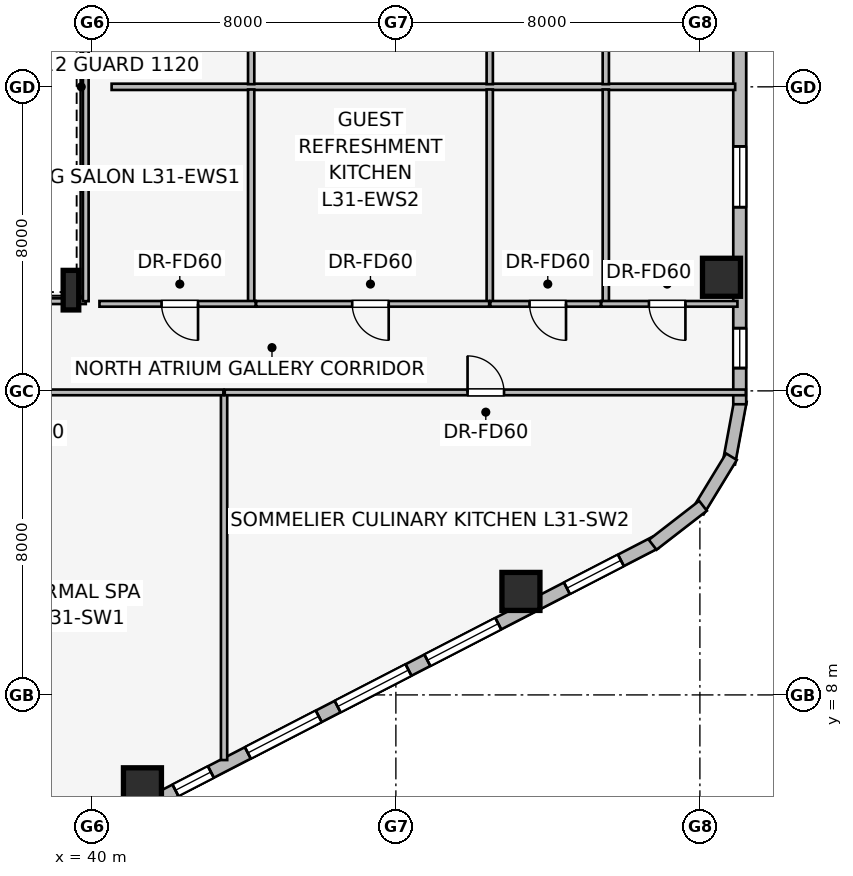
"""IFC4 building model, lengths in metres.
Left out: names, types, materials, properties, quantities, classifications, styles, units other than length and angle.
Written with IfcOpenShell. Run it as: python <this file> out.ifc"""

import sys

from ifc_helpers import new_model, si_unit, direction, frame, frame_2d, origin, origin_2d, place, context, subcontext, project, spatial, rectangle, i_section, extrude, element, fill, save


model = new_model("IFC4")
c1 = context("Model", 3, precision=1e-05, world=origin(), true_north=direction((0.0, 1.0)))
c2 = subcontext(c1, "Body", "Model", "MODEL_VIEW")
j1 = project(units=[si_unit("LENGTHUNIT", "METRE"), si_unit("PLANEANGLEUNIT", "RADIAN")], contexts=[c1])
p1 = place(None, origin())
s1 = spatial("IfcSite", under=j1, at=p1, CompositionType="ELEMENT")
p2 = place(p1, origin())
s2 = spatial("IfcBuilding", under=s1, at=p2, CompositionType="ELEMENT")
p3 = place(p2, frame((0.0, 0.0, 118.8)))
s3 = spatial("IfcBuildingStorey", under=s2, at=p3, CompositionType="ELEMENT", Elevation=118.8)
for number, where, z_axis, x_axis in (
    (1, (41.331, 5.582, 0.0), (0.0, 0.0, 1.0), (1.0, 0.0, 0.0)),
    (2, (51.291, 10.723, 0.0), (0.0, 0.0, 1.0), (1.0, 0.0, 0.0)),
    (3, (56.568, 18.989, 0.0), (0.0, 0.0, 1.0), (1.0, 0.0, 0.0)),
):
    element("IfcColumn", number, at=place(p3, frame(where, z_axis=z_axis, x_axis=x_axis)), inside=s3, PredefinedType="COLUMN", context=c2, shape_type="SweptSolid", body=[
        extrude(rectangle(XDim=1.0, YDim=1.0, at=origin_2d()), origin(), (0.0, 0.0, 1.0), 3.45),
    ])
p4 = place(p3, frame((39.45, 18.65, 0.0), z_axis=(0.0, 0.0, 1.0), x_axis=(1.0, 0.0, 0.0)))
e4 = element("IfcColumn", 4, at=p4, inside=s3, PredefinedType="COLUMN", context=c2, shape_type="SweptSolid", body=[
    extrude(i_section(OverallWidth=0.41, OverallDepth=1.041, WebThickness=0.031, FlangeThickness=0.056, at=origin_2d()), origin(), (0.0, 0.0, 1.0), 3.45),
])
p5 = place(p3, frame((54.831, 12.01, 0.0), z_axis=(0.0, 0.0, 1.0), x_axis=(-0.888613612362, -0.458656568606, 0.0)))
e5 = element("IfcWall", 5, at=p5, inside=s3, PredefinedType="STANDARD", context=c2, shape_type="SweptSolid", body=[
    extrude(rectangle(XDim=18.681, YDim=0.34, at=frame_2d((9.34, 0.0))), origin(), (0.0, 0.0, 1.0), 3.19),
])
p6 = place(p5, frame((1.023, 0.0, 0.75)))
e6 = element("IfcOpeningElement", 6, at=p6, cuts=e5, PredefinedType="OPENING", context=c2, shape_type="SweptSolid", body=[
    extrude(rectangle(XDim=1.6, YDim=1.55, at=frame_2d((0.8, 0.775))), frame((0.0, 0.18, 0.0), z_axis=(0.0, -1.0, 0.0), x_axis=(1.0, 0.0, 0.0)), (0.0, 0.0, 1.0), 0.36),
])
p7 = place(p5, frame((4.655, 0.0, 0.75)))
e7 = element("IfcOpeningElement", 7, at=p7, cuts=e5, PredefinedType="OPENING", context=c2, shape_type="SweptSolid", body=[
    extrude(rectangle(XDim=2.1, YDim=1.5, at=frame_2d((1.05, 0.75))), frame((0.0, 0.18, 0.0), z_axis=(0.0, -1.0, 0.0), x_axis=(1.0, 0.0, 0.0)), (0.0, 0.0, 1.0), 0.36),
])
p8 = place(p5, frame((7.313, 0.0, 0.75)))
e8 = element("IfcOpeningElement", 8, at=p8, cuts=e5, PredefinedType="OPENING", context=c2, shape_type="SweptSolid", body=[
    extrude(rectangle(XDim=2.1, YDim=1.5, at=frame_2d((1.05, 0.75))), frame((0.0, 0.18, 0.0), z_axis=(0.0, -1.0, 0.0), x_axis=(1.0, 0.0, 0.0)), (0.0, 0.0, 1.0), 0.36),
])
p9 = place(p5, frame((9.971, 0.0, 0.75)))
e9 = element("IfcOpeningElement", 9, at=p9, cuts=e5, PredefinedType="OPENING", context=c2, shape_type="SweptSolid", body=[
    extrude(rectangle(XDim=2.1, YDim=1.5, at=frame_2d((1.05, 0.75))), frame((0.0, 0.18, 0.0), z_axis=(0.0, -1.0, 0.0), x_axis=(1.0, 0.0, 0.0)), (0.0, 0.0, 1.0), 0.36),
])
p10 = place(p5, frame((13.165, 0.0, 0.75)))
e10 = element("IfcOpeningElement", 10, at=p10, cuts=e5, PredefinedType="OPENING", context=c2, shape_type="SweptSolid", body=[
    extrude(rectangle(XDim=1.05, YDim=1.4, at=frame_2d((0.525, 0.7))), frame((0.0, 0.18, 0.0), z_axis=(0.0, -1.0, 0.0), x_axis=(1.0, 0.0, 0.0)), (0.0, 0.0, 1.0), 0.36),
])
p11 = place(p5, frame((15.808, 0.0, 0.75)))
e11 = element("IfcOpeningElement", 11, at=p11, cuts=e5, PredefinedType="OPENING", context=c2, shape_type="SweptSolid", body=[
    extrude(rectangle(XDim=2.1, YDim=1.5, at=frame_2d((1.05, 0.75))), frame((0.0, 0.18, 0.0), z_axis=(0.0, -1.0, 0.0), x_axis=(1.0, 0.0, 0.0)), (0.0, 0.0, 1.0), 0.36),
])
p12 = place(p3, frame((57.068, 15.742, 0.0), z_axis=(0.0, 0.0, 1.0), x_axis=(-0.181984991895, -0.983301308209, 0.0)))
e12 = element("IfcWall", 12, at=p12, inside=s3, PredefinedType="STANDARD", context=c2, shape_type="SweptSolid", body=[
    extrude(rectangle(XDim=1.677, YDim=0.33, at=frame_2d((0.838, 0.0))), origin(), (0.0, 0.0, 1.0), 3.19),
])
p13 = place(p3, frame((56.83, 14.268, 0.0), z_axis=(0.0, 0.0, 1.0), x_axis=(-0.520519429557, -0.853849824883, 0.0)))
e13 = element("IfcWall", 13, at=p13, inside=s3, PredefinedType="STANDARD", context=c2, shape_type="SweptSolid", body=[
    extrude(rectangle(XDim=1.677, YDim=0.33, at=frame_2d((0.839, 0.0))), origin(), (0.0, 0.0, 1.0), 3.19),
])
p14 = place(p3, frame((56.082, 12.976, 0.0), z_axis=(0.0, 0.0, 1.0), x_axis=(-0.790621329885, -0.612305408053, 0.0)))
e14 = element("IfcWall", 14, at=p14, inside=s3, PredefinedType="STANDARD", context=c2, shape_type="SweptSolid", body=[
    extrude(rectangle(XDim=1.676, YDim=0.33, at=frame_2d((0.838, 0.0))), origin(), (0.0, 0.0, 1.0), 3.19),
])
p15 = place(p3, frame((57.048, 32.352, 0.0), z_axis=(0.0, 0.0, 1.0), x_axis=(0.0, -1.0, 0.0)))
e15 = element("IfcWall", 15, at=p15, inside=s3, PredefinedType="STANDARD", context=c2, shape_type="SweptSolid", body=[
    extrude(rectangle(XDim=16.704, YDim=0.34, at=frame_2d((8.352, 0.0))), origin(), (0.0, 0.0, 1.0), 3.19),
])
p16 = place(p15, frame((0.992, 0.0, 0.75)))
e16 = element("IfcOpeningElement", 16, at=p16, cuts=e15, PredefinedType="OPENING", context=c2, shape_type="SweptSolid", body=[
    extrude(rectangle(XDim=1.05, YDim=1.4, at=frame_2d((0.525, 0.7))), frame((0.0, 0.18, 0.0), z_axis=(0.0, -1.0, 0.0), x_axis=(1.0, 0.0, 0.0)), (0.0, 0.0, 1.0), 0.36),
])
p17 = place(p15, frame((4.935, 0.0, 0.75)))
e17 = element("IfcOpeningElement", 17, at=p17, cuts=e15, PredefinedType="OPENING", context=c2, shape_type="SweptSolid", body=[
    extrude(rectangle(XDim=2.1, YDim=1.5, at=frame_2d((1.05, 0.75))), frame((0.0, 0.18, 0.0), z_axis=(0.0, -1.0, 0.0), x_axis=(1.0, 0.0, 0.0)), (0.0, 0.0, 1.0), 0.36),
])
p18 = place(p15, frame((9.919, 0.0, 0.75)))
e18 = element("IfcOpeningElement", 18, at=p18, cuts=e15, PredefinedType="OPENING", context=c2, shape_type="SweptSolid", body=[
    extrude(rectangle(XDim=1.6, YDim=1.55, at=frame_2d((0.8, 0.775))), frame((0.0, 0.18, 0.0), z_axis=(0.0, -1.0, 0.0), x_axis=(1.0, 0.0, 0.0)), (0.0, 0.0, 1.0), 0.36),
])
p19 = place(p15, frame((14.702, 0.0, 0.75)))
e19 = element("IfcOpeningElement", 19, at=p19, cuts=e15, PredefinedType="OPENING", context=c2, shape_type="SweptSolid", body=[
    extrude(rectangle(XDim=1.05, YDim=1.4, at=frame_2d((0.525, 0.7))), frame((0.0, 0.18, 0.0), z_axis=(0.0, -1.0, 0.0), x_axis=(1.0, 0.0, 0.0)), (0.0, 0.0, 1.0), 0.36),
])
p20 = place(p3, frame((27.675, 18.36, 0.0), z_axis=(0.0, 0.0, 1.0), x_axis=(1.0, 0.0, 0.0)))
e20 = element("IfcWall", 20, at=p20, inside=s3, PredefinedType="PARTITIONING", context=c2, shape_type="SweptSolid", body=[
    extrude(rectangle(XDim=12.165, YDim=0.15, at=frame_2d((6.083, 0.0))), origin(), (0.0, 0.0, 1.0), 2.331),
])
p21 = place(p3, frame((39.84, 18.36, 0.0), z_axis=(0.0, 0.0, 1.0), x_axis=(0.0, 1.0, 0.0)))
e21 = element("IfcWall", 21, at=p21, inside=s3, PredefinedType="PARTITIONING", context=c2, shape_type="SweptSolid", body=[
    extrude(rectangle(XDim=11.28, YDim=0.15, at=frame_2d((5.64, 0.0))), origin(), (0.0, 0.0, 1.0), 3.19),
])
p22 = place(p3, frame((40.52, 24.0, 0.0), z_axis=(0.0, 0.0, 1.0), x_axis=(1.0, 0.0, 0.0)))
e22 = element("IfcWall", 22, at=p22, inside=s3, PredefinedType="PARTITIONING", context=c2, shape_type="SweptSolid", body=[
    extrude(rectangle(XDim=16.408, YDim=0.165, at=frame_2d((8.204, 0.0))), origin(), (0.0, 0.0, 1.0), 3.19),
])
p23 = place(p3, frame((44.192, 24.07, 0.0), z_axis=(0.0, 0.0, 1.0), x_axis=(0.0, 1.0, 0.0)))
e23 = element("IfcWall", 23, at=p23, inside=s3, PredefinedType="PARTITIONING", context=c2, shape_type="SweptSolid", body=[
    extrude(rectangle(XDim=5.64, YDim=0.165, at=frame_2d((2.82, 0.0))), origin(), (0.0, 0.0, 1.0), 2.733),
])
for number, where, z_axis, x_axis in (
    (24, (50.47, 24.07, 0.0), (0.0, 0.0, 1.0), (0.0, 1.0, 0.0)),
    (25, (53.524, 24.07, 0.0), (0.0, 0.0, 1.0), (0.0, 1.0, 0.0)),
):
    element("IfcWall", number, at=place(p3, frame(where, z_axis=z_axis, x_axis=x_axis)), inside=s3, PredefinedType="PARTITIONING", context=c2, shape_type="SweptSolid", body=[
        extrude(rectangle(XDim=5.64, YDim=0.165, at=frame_2d((2.82, 0.0))), origin(), (0.0, 0.0, 1.0), 3.19),
    ])
p24 = place(p3, frame((44.192, 18.29, 0.0), z_axis=(0.0, 0.0, 1.0), x_axis=(0.0, 1.0, 0.0)))
e26 = element("IfcWall", 26, at=p24, inside=s3, PredefinedType="PARTITIONING", context=c2, shape_type="SweptSolid", body=[
    extrude(rectangle(XDim=5.64, YDim=0.165, at=frame_2d((2.82, 0.0))), origin(), (0.0, 0.0, 1.0), 2.733),
])
for number, where, z_axis, x_axis in (
    (27, (50.47, 18.29, 0.0), (0.0, 0.0, 1.0), (0.0, 1.0, 0.0)),
    (28, (53.524, 18.29, 0.0), (0.0, 0.0, 1.0), (0.0, 1.0, 0.0)),
):
    element("IfcWall", number, at=place(p3, frame(where, z_axis=z_axis, x_axis=x_axis)), inside=s3, PredefinedType="PARTITIONING", context=c2, shape_type="SweptSolid", body=[
        extrude(rectangle(XDim=5.64, YDim=0.165, at=frame_2d((2.82, 0.0))), origin(), (0.0, 0.0, 1.0), 3.19),
    ])
p25 = place(p3, frame((44.312, 18.29, 0.0), z_axis=(0.0, 0.0, 1.0), x_axis=(-1.0, 0.0, 0.0)))
e29 = element("IfcWall", 29, at=p25, inside=s3, PredefinedType="PARTITIONING", context=c2, shape_type="SweptSolid", body=[
    extrude(rectangle(XDim=4.112, YDim=0.15, at=frame_2d((2.056, 0.0))), origin(), (0.0, 0.0, 1.0), 3.19),
])
p26 = place(p25, frame((1.518, 0.0, 0.0)))
e30 = element("IfcOpeningElement", 30, at=p26, cuts=e29, PredefinedType="OPENING", context=c2, shape_type="SweptSolid", body=[
    extrude(rectangle(XDim=0.96, YDim=2.0, at=frame_2d((0.48, 1.0))), frame((0.0, 0.085, 0.0), z_axis=(0.0, -1.0, 0.0), x_axis=(1.0, 0.0, 0.0)), (0.0, 0.0, 1.0), 0.17),
])
p27 = place(p3, frame((50.455, 18.29, 0.0), z_axis=(0.0, 0.0, 1.0), x_axis=(-1.0, 0.0, 0.0)))
e31 = element("IfcWall", 31, at=p27, inside=s3, PredefinedType="PARTITIONING", context=c2, shape_type="SweptSolid", body=[
    extrude(rectangle(XDim=6.133, YDim=0.15, at=frame_2d((3.066, 0.0))), origin(), (0.0, 0.0, 1.0), 3.19),
])
p28 = place(p27, frame((2.644, 0.0, 0.0)))
e32 = element("IfcOpeningElement", 32, at=p28, cuts=e31, PredefinedType="OPENING", context=c2, shape_type="SweptSolid", body=[
    extrude(rectangle(XDim=0.96, YDim=2.0, at=frame_2d((0.48, 1.0))), frame((0.0, 0.085, 0.0), z_axis=(0.0, -1.0, 0.0), x_axis=(1.0, 0.0, 0.0)), (0.0, 0.0, 1.0), 0.17),
])
p29 = place(p3, frame((53.394, 18.29, 0.0), z_axis=(0.0, 0.0, 1.0), x_axis=(-1.0, 0.0, 0.0)))
e33 = element("IfcWall", 33, at=p29, inside=s3, PredefinedType="PARTITIONING", context=c2, shape_type="SweptSolid", body=[
    extrude(rectangle(XDim=2.909, YDim=0.15, at=frame_2d((1.455, 0.0))), origin(), (0.0, 0.0, 1.0), 3.19),
])
p30 = place(p29, frame((0.917, 0.0, 0.0)))
e34 = element("IfcOpeningElement", 34, at=p30, cuts=e33, PredefinedType="OPENING", context=c2, shape_type="SweptSolid", body=[
    extrude(rectangle(XDim=0.96, YDim=2.0, at=frame_2d((0.48, 1.0))), frame((0.0, 0.085, 0.0), z_axis=(0.0, -1.0, 0.0), x_axis=(1.0, 0.0, 0.0)), (0.0, 0.0, 1.0), 0.17),
])
p31 = place(p3, frame((56.988, 18.29, 0.0), z_axis=(0.0, 0.0, 1.0), x_axis=(-1.0, 0.0, 0.0)))
e35 = element("IfcWall", 35, at=p31, inside=s3, PredefinedType="PARTITIONING", context=c2, shape_type="SweptSolid", body=[
    extrude(rectangle(XDim=3.584, YDim=0.15, at=frame_2d((1.792, 0.0))), origin(), (0.0, 0.0, 1.0), 3.19),
])
p32 = place(p31, frame((1.369, 0.0, 0.0)))
e36 = element("IfcOpeningElement", 36, at=p32, cuts=e35, PredefinedType="OPENING", context=c2, shape_type="SweptSolid", body=[
    extrude(rectangle(XDim=0.96, YDim=2.0, at=frame_2d((0.48, 1.0))), frame((0.0, 0.085, 0.0), z_axis=(0.0, -1.0, 0.0), x_axis=(1.0, 0.0, 0.0)), (0.0, 0.0, 1.0), 0.17),
])
p33 = place(p3, frame((43.479, 6.286, 0.0), z_axis=(0.0, 0.0, 1.0), x_axis=(0.0, 1.0, 0.0)))
e37 = element("IfcWall", 37, at=p33, inside=s3, PredefinedType="PARTITIONING", context=c2, shape_type="SweptSolid", body=[
    extrude(rectangle(XDim=9.644, YDim=0.165, at=frame_2d((4.822, 0.0))), origin(), (0.0, 0.0, 1.0), 3.19),
])
p34 = place(p3, frame((32.85, 15.96, 0.0), z_axis=(0.0, 0.0, 1.0), x_axis=(1.0, 0.0, 0.0)))
e38 = element("IfcWall", 38, at=p34, inside=s3, PredefinedType="PARTITIONING", context=c2, shape_type="SweptSolid", body=[
    extrude(rectangle(XDim=10.611, YDim=0.15, at=frame_2d((5.305, 0.0))), origin(), (0.0, 0.0, 1.0), 3.19),
])
p35 = place(p34, frame((4.826, 0.0, 0.0)))
e39 = element("IfcOpeningElement", 39, at=p35, cuts=e38, PredefinedType="OPENING", context=c2, shape_type="SweptSolid", body=[
    extrude(rectangle(XDim=0.96, YDim=2.0, at=frame_2d((0.48, 1.0))), frame((0.0, 0.085, 0.0), z_axis=(0.0, -1.0, 0.0), x_axis=(1.0, 0.0, 0.0)), (0.0, 0.0, 1.0), 0.17),
])
p36 = place(p3, frame((43.497, 15.96, 0.0), z_axis=(0.0, 0.0, 1.0), x_axis=(1.0, 0.0, 0.0)))
e40 = element("IfcWall", 40, at=p36, inside=s3, PredefinedType="PARTITIONING", context=c2, shape_type="SweptSolid", body=[
    extrude(rectangle(XDim=13.711, YDim=0.15, at=frame_2d((6.855, 0.0))), origin(), (0.0, 0.0, 1.0), 3.19),
])
p37 = place(p36, frame((6.389, 0.0, 0.0)))
e41 = element("IfcOpeningElement", 41, at=p37, cuts=e40, PredefinedType="OPENING", context=c2, shape_type="SweptSolid", body=[
    extrude(rectangle(XDim=0.96, YDim=2.0, at=frame_2d((0.48, 1.0))), frame((0.0, 0.085, 0.0), z_axis=(0.0, -1.0, 0.0), x_axis=(1.0, 0.0, 0.0)), (0.0, 0.0, 1.0), 0.17),
])
p38 = place(p6, origin())
e42 = element("IfcWindow", 42, at=p38, inside=s3, PartitioningType="SINGLE_PANEL", PredefinedType="WINDOW", context=c2, shape_type="SweptSolid", body=[
    extrude(rectangle(XDim=1.6, YDim=1.55, at=frame_2d((0.8, 0.775))), frame((0.0, 0.03, 0.0), z_axis=(0.0, -1.0, 0.0), x_axis=(1.0, 0.0, 0.0)), (0.0, 0.0, 1.0), 0.06),
])
fill(e6, e42)
p39 = place(p7, origin())
e43 = element("IfcWindow", 43, at=p39, inside=s3, PartitioningType="SINGLE_PANEL", PredefinedType="WINDOW", context=c2, shape_type="SweptSolid", body=[
    extrude(rectangle(XDim=2.1, YDim=1.5, at=frame_2d((1.05, 0.75))), frame((0.0, 0.03, 0.0), z_axis=(0.0, -1.0, 0.0), x_axis=(1.0, 0.0, 0.0)), (0.0, 0.0, 1.0), 0.06),
])
fill(e7, e43)
p40 = place(p8, origin())
e44 = element("IfcWindow", 44, at=p40, inside=s3, PartitioningType="SINGLE_PANEL", PredefinedType="WINDOW", context=c2, shape_type="SweptSolid", body=[
    extrude(rectangle(XDim=2.1, YDim=1.5, at=frame_2d((1.05, 0.75))), frame((0.0, 0.03, 0.0), z_axis=(0.0, -1.0, 0.0), x_axis=(1.0, 0.0, 0.0)), (0.0, 0.0, 1.0), 0.06),
])
fill(e8, e44)
p41 = place(p9, origin())
e45 = element("IfcWindow", 45, at=p41, inside=s3, PartitioningType="SINGLE_PANEL", PredefinedType="WINDOW", context=c2, shape_type="SweptSolid", body=[
    extrude(rectangle(XDim=2.1, YDim=1.5, at=frame_2d((1.05, 0.75))), frame((0.0, 0.03, 0.0), z_axis=(0.0, -1.0, 0.0), x_axis=(1.0, 0.0, 0.0)), (0.0, 0.0, 1.0), 0.06),
])
fill(e9, e45)
p42 = place(p10, origin())
e46 = element("IfcWindow", 46, at=p42, inside=s3, PartitioningType="SINGLE_PANEL", PredefinedType="WINDOW", context=c2, shape_type="SweptSolid", body=[
    extrude(rectangle(XDim=1.05, YDim=1.4, at=frame_2d((0.525, 0.7))), frame((0.0, 0.03, 0.0), z_axis=(0.0, -1.0, 0.0), x_axis=(1.0, 0.0, 0.0)), (0.0, 0.0, 1.0), 0.06),
])
fill(e10, e46)
p43 = place(p18, origin())
e47 = element("IfcWindow", 47, at=p43, inside=s3, PartitioningType="SINGLE_PANEL", PredefinedType="WINDOW", context=c2, shape_type="SweptSolid", body=[
    extrude(rectangle(XDim=1.6, YDim=1.55, at=frame_2d((0.8, 0.775))), frame((0.0, 0.03, 0.0), z_axis=(0.0, -1.0, 0.0), x_axis=(1.0, 0.0, 0.0)), (0.0, 0.0, 1.0), 0.06),
])
fill(e18, e47)
p44 = place(p19, origin())
e48 = element("IfcWindow", 48, at=p44, inside=s3, PartitioningType="SINGLE_PANEL", PredefinedType="WINDOW", context=c2, shape_type="SweptSolid", body=[
    extrude(rectangle(XDim=1.05, YDim=1.4, at=frame_2d((0.525, 0.7))), frame((0.0, 0.03, 0.0), z_axis=(0.0, -1.0, 0.0), x_axis=(1.0, 0.0, 0.0)), (0.0, 0.0, 1.0), 0.06),
])
fill(e19, e48)
p45 = place(p26, origin())
e49 = element("IfcDoor", 49, at=p45, inside=s3, OperationType="SINGLE_SWING_LEFT", PredefinedType="DOOR", context=c2, shape_type="SweptSolid", body=[
    extrude(rectangle(XDim=0.96, YDim=2.0, at=frame_2d((0.48, 1.0))), frame((0.0, 0.025, 0.0), z_axis=(0.0, -1.0, 0.0), x_axis=(1.0, 0.0, 0.0)), (0.0, 0.0, 1.0), 0.05),
])
fill(e30, e49)
p46 = place(p28, origin())
e50 = element("IfcDoor", 50, at=p46, inside=s3, OperationType="SINGLE_SWING_LEFT", PredefinedType="DOOR", context=c2, shape_type="SweptSolid", body=[
    extrude(rectangle(XDim=0.96, YDim=2.0, at=frame_2d((0.48, 1.0))), frame((0.0, 0.025, 0.0), z_axis=(0.0, -1.0, 0.0), x_axis=(1.0, 0.0, 0.0)), (0.0, 0.0, 1.0), 0.05),
])
fill(e32, e50)
p47 = place(p30, origin())
e51 = element("IfcDoor", 51, at=p47, inside=s3, OperationType="SINGLE_SWING_LEFT", PredefinedType="DOOR", context=c2, shape_type="SweptSolid", body=[
    extrude(rectangle(XDim=0.96, YDim=2.0, at=frame_2d((0.48, 1.0))), frame((0.0, 0.025, 0.0), z_axis=(0.0, -1.0, 0.0), x_axis=(1.0, 0.0, 0.0)), (0.0, 0.0, 1.0), 0.05),
])
fill(e34, e51)
p48 = place(p32, origin())
e52 = element("IfcDoor", 52, at=p48, inside=s3, OperationType="SINGLE_SWING_LEFT", PredefinedType="DOOR", context=c2, shape_type="SweptSolid", body=[
    extrude(rectangle(XDim=0.96, YDim=2.0, at=frame_2d((0.48, 1.0))), frame((0.0, 0.025, 0.0), z_axis=(0.0, -1.0, 0.0), x_axis=(1.0, 0.0, 0.0)), (0.0, 0.0, 1.0), 0.05),
])
fill(e36, e52)
p49 = place(p37, origin())
e53 = element("IfcDoor", 53, at=p49, inside=s3, OperationType="SINGLE_SWING_LEFT", PredefinedType="DOOR", context=c2, shape_type="SweptSolid", body=[
    extrude(rectangle(XDim=0.96, YDim=2.0, at=frame_2d((0.48, 1.0))), frame((0.0, 0.025, 0.0), z_axis=(0.0, -1.0, 0.0), x_axis=(1.0, 0.0, 0.0)), (0.0, 0.0, 1.0), 0.05),
])
fill(e41, e53)
save(model, sys.argv[1])
